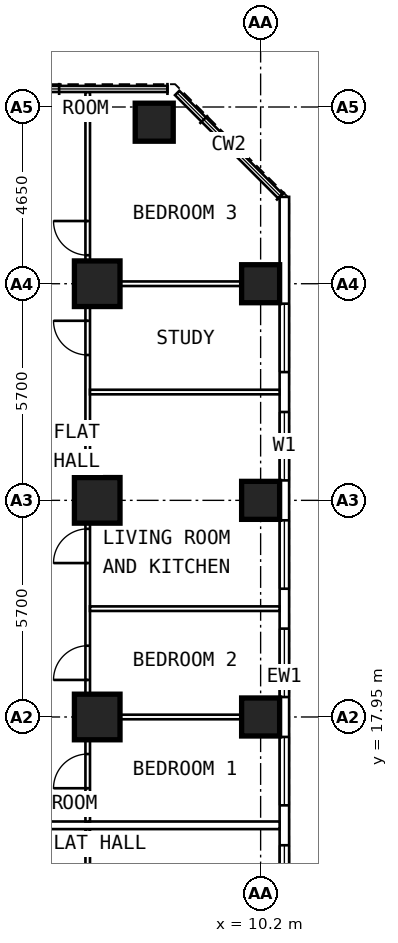
"""IFC4 building model, lengths in metres.
Left out: names, types, materials, properties, quantities, classifications, styles, units other than length and angle.
Written with IfcOpenShell. Run it as: python <this file> out.ifc"""

import sys

from ifc_helpers import new_model, si_unit, direction, frame, frame_2d, origin, origin_2d, place, context, subcontext, project, spatial, rectangle, extrude, element, fill, save


model = new_model("IFC4")
c1 = context("Model", 3, precision=1e-05, world=origin(), true_north=direction((0.0, 1.0)))
c2 = subcontext(c1, "Body", "Model", "MODEL_VIEW")
j1 = project(units=[si_unit("LENGTHUNIT", "METRE"), si_unit("PLANEANGLEUNIT", "RADIAN")], contexts=[c1])
p1 = place(None, origin())
s1 = spatial("IfcSite", under=j1, at=p1, CompositionType="ELEMENT")
p2 = place(p1, origin())
s2 = spatial("IfcBuilding", under=s1, at=p2, CompositionType="ELEMENT")
p3 = place(p2, frame((0.0, 0.0, 61.0)))
s3 = spatial("IfcBuildingStorey", under=s2, at=p3, CompositionType="ELEMENT", Elevation=61.0)
for number, where, z_axis, x_axis in (
    (1, (10.2, 17.95, 0.0), (0.0, 0.0, 1.0), (0.0, 1.0, 0.0)),
    (2, (10.2, 23.65, 0.0), (0.0, 0.0, 1.0), (0.0, 1.0, 0.0)),
    (3, (10.2, 29.35, 0.0), (0.0, 0.0, 1.0), (0.0, 1.0, 0.0)),
    (4, (7.4, 33.6, 0.0), (0.0, 0.0, 1.0), (0.0, 1.0, 0.0)),
):
    element("IfcColumn", number, at=place(p3, frame(where, z_axis=z_axis, x_axis=x_axis)), inside=s3, PredefinedType="COLUMN", context=c2, shape_type="SweptSolid", body=[
        extrude(rectangle(XDim=1.0, YDim=1.0, at=origin_2d()), origin(), (0.0, 0.0, 1.0), 3.6),
    ])
for number, where, z_axis, x_axis in (
    (5, (5.9, 17.95, 0.0), (0.0, 0.0, 1.0), (0.0, 1.0, 0.0)),
    (6, (5.9, 23.65, 0.0), (0.0, 0.0, 1.0), (0.0, 1.0, 0.0)),
    (7, (5.9, 29.35, 0.0), (0.0, 0.0, 1.0), (0.0, 1.0, 0.0)),
):
    element("IfcColumn", number, at=place(p3, frame(where, z_axis=z_axis, x_axis=x_axis)), inside=s3, PredefinedType="COLUMN", context=c2, shape_type="SweptSolid", body=[
        extrude(rectangle(XDim=1.2, YDim=1.2, at=origin_2d()), origin(), (0.0, 0.0, 1.0), 3.6),
    ])
p4 = place(p3, frame((10.825, 6.394, 0.0), z_axis=(0.0, 0.0, 1.0), x_axis=(0.0, 1.0, 0.0)))
e8 = element("IfcWall", 8, at=p4, inside=s3, PredefinedType="SOLIDWALL", context=c2, shape_type="SweptSolid", body=[
    extrude(rectangle(XDim=25.241, YDim=0.25, at=frame_2d((12.621, 0.0))), origin(), (0.0, 0.0, 1.0), 3.35),
])
p5 = place(p4, frame((0.681, 0.0, 0.8)))
e9 = element("IfcOpeningElement", 9, at=p5, cuts=e8, PredefinedType="OPENING", context=c2, shape_type="SweptSolid", body=[
    extrude(rectangle(XDim=1.8, YDim=1.8, at=frame_2d((0.9, 0.9))), frame((0.0, 0.137, 0.0), z_axis=(0.0, -1.0, 0.0), x_axis=(1.0, 0.0, 0.0)), (0.0, 0.0, 1.0), 0.274),
])
p6 = place(p4, frame((3.531, 0.0, 0.8)))
e10 = element("IfcOpeningElement", 10, at=p6, cuts=e8, PredefinedType="OPENING", context=c2, shape_type="SweptSolid", body=[
    extrude(rectangle(XDim=1.8, YDim=1.8, at=frame_2d((0.9, 0.9))), frame((0.0, 0.137, 0.0), z_axis=(0.0, -1.0, 0.0), x_axis=(1.0, 0.0, 0.0)), (0.0, 0.0, 1.0), 0.274),
])
p7 = place(p4, frame((6.381, 0.0, 0.8)))
e11 = element("IfcOpeningElement", 11, at=p7, cuts=e8, PredefinedType="OPENING", context=c2, shape_type="SweptSolid", body=[
    extrude(rectangle(XDim=1.8, YDim=1.8, at=frame_2d((0.9, 0.9))), frame((0.0, 0.137, 0.0), z_axis=(0.0, -1.0, 0.0), x_axis=(1.0, 0.0, 0.0)), (0.0, 0.0, 1.0), 0.274),
])
p8 = place(p4, frame((9.231, 0.0, 0.8)))
e12 = element("IfcOpeningElement", 12, at=p8, cuts=e8, PredefinedType="OPENING", context=c2, shape_type="SweptSolid", body=[
    extrude(rectangle(XDim=1.8, YDim=1.8, at=frame_2d((0.9, 0.9))), frame((0.0, 0.137, 0.0), z_axis=(0.0, -1.0, 0.0), x_axis=(1.0, 0.0, 0.0)), (0.0, 0.0, 1.0), 0.274),
])
p9 = place(p4, frame((12.081, 0.0, 0.8)))
e13 = element("IfcOpeningElement", 13, at=p9, cuts=e8, PredefinedType="OPENING", context=c2, shape_type="SweptSolid", body=[
    extrude(rectangle(XDim=1.8, YDim=1.8, at=frame_2d((0.9, 0.9))), frame((0.0, 0.137, 0.0), z_axis=(0.0, -1.0, 0.0), x_axis=(1.0, 0.0, 0.0)), (0.0, 0.0, 1.0), 0.274),
])
p10 = place(p4, frame((14.931, 0.0, 0.8)))
e14 = element("IfcOpeningElement", 14, at=p10, cuts=e8, PredefinedType="OPENING", context=c2, shape_type="SweptSolid", body=[
    extrude(rectangle(XDim=1.8, YDim=1.8, at=frame_2d((0.9, 0.9))), frame((0.0, 0.137, 0.0), z_axis=(0.0, -1.0, 0.0), x_axis=(1.0, 0.0, 0.0)), (0.0, 0.0, 1.0), 0.274),
])
p11 = place(p4, frame((17.781, 0.0, 0.8)))
e15 = element("IfcOpeningElement", 15, at=p11, cuts=e8, PredefinedType="OPENING", context=c2, shape_type="SweptSolid", body=[
    extrude(rectangle(XDim=1.8, YDim=1.8, at=frame_2d((0.9, 0.9))), frame((0.0, 0.137, 0.0), z_axis=(0.0, -1.0, 0.0), x_axis=(1.0, 0.0, 0.0)), (0.0, 0.0, 1.0), 0.274),
])
p12 = place(p4, frame((20.631, 0.0, 0.8)))
e16 = element("IfcOpeningElement", 16, at=p12, cuts=e8, PredefinedType="OPENING", context=c2, shape_type="SweptSolid", body=[
    extrude(rectangle(XDim=1.8, YDim=1.8, at=frame_2d((0.9, 0.9))), frame((0.0, 0.137, 0.0), z_axis=(0.0, -1.0, 0.0), x_axis=(1.0, 0.0, 0.0)), (0.0, 0.0, 1.0), 0.274),
])
p13 = place(p3, frame((5.65, 9.6, 0.0), z_axis=(0.0, 0.0, 1.0), x_axis=(0.0, 1.0, 0.0)))
e17 = element("IfcWall", 17, at=p13, inside=s3, PredefinedType="PARTITIONING", context=c2, shape_type="SweptSolid", body=[
    extrude(rectangle(XDim=5.4, YDim=0.12, at=frame_2d((2.7, 0.0))), origin(), (0.0, 0.0, 1.0), 3.35),
])
p14 = place(p13, frame((3.4, 0.0, 0.0)))
e18 = element("IfcOpeningElement", 18, at=p14, cuts=e17, PredefinedType="OPENING", context=c2, shape_type="SweptSolid", body=[
    extrude(rectangle(XDim=0.9, YDim=2.1, at=frame_2d((0.45, 1.05))), frame((0.0, 0.072, 0.0), z_axis=(0.0, -1.0, 0.0), x_axis=(1.0, 0.0, 0.0)), (0.0, 0.0, 1.0), 0.144),
])
p15 = place(p3, frame((5.65, 15.2, 0.0), z_axis=(0.0, 0.0, 1.0), x_axis=(0.0, 1.0, 0.0)))
e19 = element("IfcWall", 19, at=p15, inside=s3, PredefinedType="PARTITIONING", context=c2, shape_type="SweptSolid", body=[
    extrude(rectangle(XDim=19.195, YDim=0.12, at=frame_2d((9.598, 0.0))), origin(), (0.0, 0.0, 1.0), 3.35),
])
p16 = place(p15, frame((0.875, 0.0, 0.0)))
e20 = element("IfcOpeningElement", 20, at=p16, cuts=e19, PredefinedType="OPENING", context=c2, shape_type="SweptSolid", body=[
    extrude(rectangle(XDim=0.9, YDim=2.1, at=frame_2d((0.45, 1.05))), frame((0.0, 0.072, 0.0), z_axis=(0.0, -1.0, 0.0), x_axis=(1.0, 0.0, 0.0)), (0.0, 0.0, 1.0), 0.144),
])
p17 = place(p15, frame((3.725, 0.0, 0.0)))
e21 = element("IfcOpeningElement", 21, at=p17, cuts=e19, PredefinedType="OPENING", context=c2, shape_type="SweptSolid", body=[
    extrude(rectangle(XDim=0.9, YDim=2.1, at=frame_2d((0.45, 1.05))), frame((0.0, 0.072, 0.0), z_axis=(0.0, -1.0, 0.0), x_axis=(1.0, 0.0, 0.0)), (0.0, 0.0, 1.0), 0.144),
])
p18 = place(p15, frame((6.8, 0.0, 0.0)))
e22 = element("IfcOpeningElement", 22, at=p18, cuts=e19, PredefinedType="OPENING", context=c2, shape_type="SweptSolid", body=[
    extrude(rectangle(XDim=0.9, YDim=2.1, at=frame_2d((0.45, 1.05))), frame((0.0, 0.072, 0.0), z_axis=(0.0, -1.0, 0.0), x_axis=(1.0, 0.0, 0.0)), (0.0, 0.0, 1.0), 0.144),
])
p19 = place(p15, frame((12.275, 0.0, 0.0)))
e23 = element("IfcOpeningElement", 23, at=p19, cuts=e19, PredefinedType="OPENING", context=c2, shape_type="SweptSolid", body=[
    extrude(rectangle(XDim=0.9, YDim=2.1, at=frame_2d((0.45, 1.05))), frame((0.0, 0.072, 0.0), z_axis=(0.0, -1.0, 0.0), x_axis=(1.0, 0.0, 0.0)), (0.0, 0.0, 1.0), 0.144),
])
p20 = place(p15, frame((14.9, 0.0, 0.0)))
e24 = element("IfcOpeningElement", 24, at=p20, cuts=e19, PredefinedType="OPENING", context=c2, shape_type="SweptSolid", body=[
    extrude(rectangle(XDim=0.9, YDim=2.1, at=frame_2d((0.45, 1.05))), frame((0.0, 0.072, 0.0), z_axis=(0.0, -1.0, 0.0), x_axis=(1.0, 0.0, 0.0)), (0.0, 0.0, 1.0), 0.144),
])
p21 = place(p3, frame((5.71, 17.95, 0.0), z_axis=(0.0, 0.0, 1.0), x_axis=(1.0, 0.0, 0.0)))
e25 = element("IfcWall", 25, at=p21, inside=s3, PredefinedType="PARTITIONING", context=c2, shape_type="SweptSolid", body=[
    extrude(rectangle(XDim=4.99, YDim=0.12, at=frame_2d((2.495, 0.0))), origin(), (0.0, 0.0, 1.0), 2.45),
])
for number, where, z_axis, x_axis in (
    (26, (5.71, 20.8, 0.0), (0.0, 0.0, 1.0), (1.0, 0.0, 0.0)),
    (27, (5.71, 26.5, 0.0), (0.0, 0.0, 1.0), (1.0, 0.0, 0.0)),
):
    element("IfcWall", number, at=place(p3, frame(where, z_axis=z_axis, x_axis=x_axis)), inside=s3, PredefinedType="PARTITIONING", context=c2, shape_type="SweptSolid", body=[
        extrude(rectangle(XDim=4.99, YDim=0.12, at=frame_2d((2.495, 0.0))), origin(), (0.0, 0.0, 1.0), 3.35),
    ])
p22 = place(p3, frame((5.71, 29.35, 0.0), z_axis=(0.0, 0.0, 1.0), x_axis=(1.0, 0.0, 0.0)))
e28 = element("IfcWall", 28, at=p22, inside=s3, PredefinedType="PARTITIONING", context=c2, shape_type="SweptSolid", body=[
    extrude(rectangle(XDim=4.99, YDim=0.12, at=frame_2d((2.495, 0.0))), origin(), (0.0, 0.0, 1.0), 2.45),
])
p23 = place(p3, frame((2.1, 15.1, 0.0), z_axis=(0.0, 0.0, 1.0), x_axis=(1.0, 0.0, 0.0)))
e29 = element("IfcWall", 29, at=p23, inside=s3, PredefinedType="PARTITIONING", context=c2, shape_type="SweptSolid", body=[
    extrude(rectangle(XDim=8.6, YDim=0.2, at=frame_2d((4.3, 0.0))), origin(), (0.0, 0.0, 1.0), 3.35),
])
p24 = place(p7, origin())
e30 = element("IfcWindow", 30, at=p24, inside=s3, PartitioningType="SINGLE_PANEL", PredefinedType="WINDOW", context=c2, shape_type="SweptSolid", body=[
    extrude(rectangle(XDim=1.8, YDim=1.8, at=frame_2d((0.9, 0.9))), frame((0.0, 0.03, 0.0), z_axis=(0.0, -1.0, 0.0), x_axis=(1.0, 0.0, 0.0)), (0.0, 0.0, 1.0), 0.06),
])
fill(e11, e30)
p25 = place(p8, origin())
e31 = element("IfcWindow", 31, at=p25, inside=s3, PartitioningType="SINGLE_PANEL", PredefinedType="WINDOW", context=c2, shape_type="SweptSolid", body=[
    extrude(rectangle(XDim=1.8, YDim=1.8, at=frame_2d((0.9, 0.9))), frame((0.0, 0.03, 0.0), z_axis=(0.0, -1.0, 0.0), x_axis=(1.0, 0.0, 0.0)), (0.0, 0.0, 1.0), 0.06),
])
fill(e12, e31)
p26 = place(p9, origin())
e32 = element("IfcWindow", 32, at=p26, inside=s3, PartitioningType="SINGLE_PANEL", PredefinedType="WINDOW", context=c2, shape_type="SweptSolid", body=[
    extrude(rectangle(XDim=1.8, YDim=1.8, at=frame_2d((0.9, 0.9))), frame((0.0, 0.03, 0.0), z_axis=(0.0, -1.0, 0.0), x_axis=(1.0, 0.0, 0.0)), (0.0, 0.0, 1.0), 0.06),
])
fill(e13, e32)
p27 = place(p10, origin())
e33 = element("IfcWindow", 33, at=p27, inside=s3, PartitioningType="SINGLE_PANEL", PredefinedType="WINDOW", context=c2, shape_type="SweptSolid", body=[
    extrude(rectangle(XDim=1.8, YDim=1.8, at=frame_2d((0.9, 0.9))), frame((0.0, 0.03, 0.0), z_axis=(0.0, -1.0, 0.0), x_axis=(1.0, 0.0, 0.0)), (0.0, 0.0, 1.0), 0.06),
])
fill(e14, e33)
p28 = place(p11, origin())
e34 = element("IfcWindow", 34, at=p28, inside=s3, PartitioningType="SINGLE_PANEL", PredefinedType="WINDOW", context=c2, shape_type="SweptSolid", body=[
    extrude(rectangle(XDim=1.8, YDim=1.8, at=frame_2d((0.9, 0.9))), frame((0.0, 0.03, 0.0), z_axis=(0.0, -1.0, 0.0), x_axis=(1.0, 0.0, 0.0)), (0.0, 0.0, 1.0), 0.06),
])
fill(e15, e34)
p29 = place(p12, origin())
e35 = element("IfcWindow", 35, at=p29, inside=s3, PartitioningType="SINGLE_PANEL", PredefinedType="WINDOW", context=c2, shape_type="SweptSolid", body=[
    extrude(rectangle(XDim=1.8, YDim=1.8, at=frame_2d((0.9, 0.9))), frame((0.0, 0.03, 0.0), z_axis=(0.0, -1.0, 0.0), x_axis=(1.0, 0.0, 0.0)), (0.0, 0.0, 1.0), 0.06),
])
fill(e16, e35)
p30 = place(p16, origin())
e36 = element("IfcDoor", 36, at=p30, inside=s3, OperationType="SINGLE_SWING_LEFT", PredefinedType="DOOR", context=c2, shape_type="SweptSolid", body=[
    extrude(rectangle(XDim=0.9, YDim=2.1, at=frame_2d((0.45, 1.05))), frame((0.0, 0.025, 0.0), z_axis=(0.0, -1.0, 0.0), x_axis=(1.0, 0.0, 0.0)), (0.0, 0.0, 1.0), 0.05),
])
fill(e20, e36)
p31 = place(p17, origin())
e37 = element("IfcDoor", 37, at=p31, inside=s3, OperationType="SINGLE_SWING_LEFT", PredefinedType="DOOR", context=c2, shape_type="SweptSolid", body=[
    extrude(rectangle(XDim=0.9, YDim=2.1, at=frame_2d((0.45, 1.05))), frame((0.0, 0.025, 0.0), z_axis=(0.0, -1.0, 0.0), x_axis=(1.0, 0.0, 0.0)), (0.0, 0.0, 1.0), 0.05),
])
fill(e21, e37)
p32 = place(p18, origin())
e38 = element("IfcDoor", 38, at=p32, inside=s3, OperationType="SINGLE_SWING_LEFT", PredefinedType="DOOR", context=c2, shape_type="SweptSolid", body=[
    extrude(rectangle(XDim=0.9, YDim=2.1, at=frame_2d((0.45, 1.05))), frame((0.0, 0.025, 0.0), z_axis=(0.0, -1.0, 0.0), x_axis=(1.0, 0.0, 0.0)), (0.0, 0.0, 1.0), 0.05),
])
fill(e22, e38)
p33 = place(p19, origin())
e39 = element("IfcDoor", 39, at=p33, inside=s3, OperationType="SINGLE_SWING_RIGHT", PredefinedType="DOOR", context=c2, shape_type="SweptSolid", body=[
    extrude(rectangle(XDim=0.9, YDim=2.1, at=frame_2d((0.45, 1.05))), frame((0.0, 0.025, 0.0), z_axis=(0.0, -1.0, 0.0), x_axis=(1.0, 0.0, 0.0)), (0.0, 0.0, 1.0), 0.05),
])
fill(e23, e39)
p34 = place(p20, origin())
e40 = element("IfcDoor", 40, at=p34, inside=s3, OperationType="SINGLE_SWING_RIGHT", PredefinedType="DOOR", context=c2, shape_type="SweptSolid", body=[
    extrude(rectangle(XDim=0.9, YDim=2.1, at=frame_2d((0.45, 1.05))), frame((0.0, 0.025, 0.0), z_axis=(0.0, -1.0, 0.0), x_axis=(1.0, 0.0, 0.0)), (0.0, 0.0, 1.0), 0.05),
])
fill(e24, e40)
save(model, sys.argv[1])
